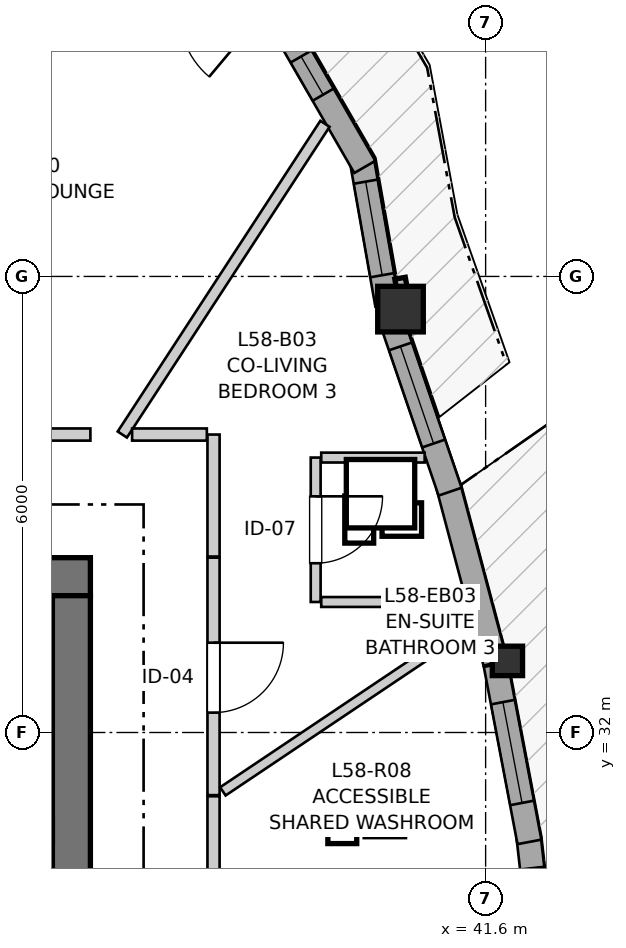
"""IFC4 building model, lengths in metres.
Left out: names, types, materials, properties, quantities, classifications, styles, units other than length and angle.
Written with IfcOpenShell. Run it as: python <this file> out.ifc"""

import sys

from ifc_helpers import new_model, si_unit, direction, frame, frame_2d, origin, origin_2d, place, context, subcontext, project, spatial, rectangle, i_section, extrude, source, transform, mapped, element, fill, save


model = new_model("IFC4")
c1 = context("Model", 3, precision=1e-05, world=origin(), true_north=direction((0.0, 1.0)))
c2 = subcontext(c1, "Body", "Model", "MODEL_VIEW")
j1 = project(units=[si_unit("LENGTHUNIT", "METRE"), si_unit("PLANEANGLEUNIT", "RADIAN")], contexts=[c1])
p1 = place(None, origin())
s1 = spatial("IfcSite", under=j1, at=p1, CompositionType="ELEMENT")
p2 = place(p1, origin())
s2 = spatial("IfcBuilding", under=s1, at=p2, CompositionType="ELEMENT")
p3 = place(p2, frame((0.0, 0.0, 195.6)))
s3 = spatial("IfcBuildingStorey", under=s2, at=p3, CompositionType="ELEMENT", Elevation=195.6)
p4 = place(p3, frame((36.4, 34.05, 0.0), z_axis=(0.0, 0.0, 1.0), x_axis=(-1.0, 0.0, 0.0)))
e1 = element("IfcWall", 1, at=p4, inside=s3, PredefinedType="SHEAR", context=c2, shape_type="SweptSolid", body=[
    extrude(rectangle(XDim=12.1, YDim=0.5, at=frame_2d((6.05, 0.0))), origin(), (0.0, 0.0, 1.0), 2.96),
])
p5 = place(p3, frame((36.15, 18.2, 0.0), z_axis=(0.0, 0.0, 1.0), x_axis=(0.0, 1.0, 0.0)))
e2 = element("IfcWall", 2, at=p5, inside=s3, PredefinedType="SHEAR", context=c2, shape_type="SweptSolid", body=[
    extrude(rectangle(XDim=15.6, YDim=0.5, at=frame_2d((7.8, 0.0))), origin(), (0.0, 0.0, 1.0), 2.96),
])
p6 = place(p5, frame((4.25, 0.0, 0.0)))
e3 = element("IfcOpeningElement", 3, at=p6, cuts=e2, PredefinedType="OPENING", context=c2, shape_type="SweptSolid", body=[
    extrude(rectangle(XDim=1.1, YDim=2.15, at=frame_2d((0.55, 1.075))), frame((0.0, 0.26, 0.0), z_axis=(0.0, -1.0, 0.0), x_axis=(1.0, 0.0, 0.0)), (0.0, 0.0, 1.0), 0.52),
])
p7 = place(p5, frame((10.25, 0.0, 0.0)))
e4 = element("IfcOpeningElement", 4, at=p7, cuts=e2, PredefinedType="OPENING", context=c2, shape_type="SweptSolid", body=[
    extrude(rectangle(XDim=1.1, YDim=2.15, at=frame_2d((0.55, 1.075))), frame((0.0, 0.26, 0.0), z_axis=(0.0, -1.0, 0.0), x_axis=(1.0, 0.0, 0.0)), (0.0, 0.0, 1.0), 0.52),
])
p8 = place(p3, frame((24.8, 30.7, 0.0), z_axis=(0.0, 0.0, 1.0), x_axis=(1.0, 0.0, 0.0)))
e5 = element("IfcWall", 5, at=p8, inside=s3, PredefinedType="SHEAR", context=c2, shape_type="SweptSolid", body=[
    extrude(rectangle(XDim=11.1, YDim=0.3, at=frame_2d((5.55, 0.0))), origin(), (0.0, 0.0, 1.0), 2.96),
])
p9 = place(p8, frame((6.22, 0.0, 0.0)))
e6 = element("IfcOpeningElement", 6, at=p9, cuts=e5, PredefinedType="OPENING", context=c2, shape_type="SweptSolid", body=[
    extrude(rectangle(XDim=0.98, YDim=2.15, at=frame_2d((0.49, 1.075))), frame((0.0, 0.16, 0.0), z_axis=(0.0, -1.0, 0.0), x_axis=(1.0, 0.0, 0.0)), (0.0, 0.0, 1.0), 0.32),
])
p10 = place(p8, frame((9.15, 0.0, 0.0)))
e7 = element("IfcOpeningElement", 7, at=p10, cuts=e5, PredefinedType="OPENING", context=c2, shape_type="SweptSolid", body=[
    extrude(rectangle(XDim=1.15, YDim=2.15, at=frame_2d((0.575, 1.075))), frame((0.0, 0.16, 0.0), z_axis=(0.0, -1.0, 0.0), x_axis=(1.0, 0.0, 0.0)), (0.0, 0.0, 1.0), 0.32),
])
m1 = source(origin(), c2, "Body", "SweptSolid", [
    extrude(i_section(OverallWidth=0.398, OverallDepth=0.387, WebThickness=0.019, FlangeThickness=0.03, FilletRadius=0.015, at=origin_2d()), origin(), (0.0, 0.0, 1.0), 2.96),
])
p11 = place(p3, frame((41.887, 32.942, 0.0), z_axis=(0.0, 0.0, 1.0), x_axis=(1.0, 0.0, 0.0)))
e8 = element("IfcColumn", 8, at=p11, inside=s3, PredefinedType="PILASTER", context=c2, shape_type="MappedRepresentation", body=[
    mapped(m1, transform((0.0, 0.0, 0.0), x_axis=(1.0, 0.0, 0.0), y_axis=(0.0, 1.0, 0.0), z_axis=(0.0, 0.0, 1.0), scale=1.0)),
])
m2 = source(origin(), c2, "Body", "SweptSolid", [
    extrude(rectangle(XDim=0.6, YDim=0.6, at=origin_2d()), origin(), (0.0, 0.0, 1.0), 2.96),
])
p12 = place(p3, frame((40.48, 37.57, 0.0), z_axis=(0.0, 0.0, 1.0), x_axis=(1.0, 0.0, 0.0)))
e9 = element("IfcColumn", 9, at=p12, inside=s3, PredefinedType="COLUMN", context=c2, shape_type="MappedRepresentation", body=[
    mapped(m2, transform((0.0, 0.0, 0.0), x_axis=(1.0, 0.0, 0.0), y_axis=(0.0, 1.0, 0.0), z_axis=(0.0, 0.0, 1.0), scale=1.0)),
])
p13 = place(p3, frame((42.421, 28.385, 0.0), z_axis=(0.0, 0.0, 1.0), x_axis=(-0.113220012761, 0.993569941529, 0.0)))
e10 = element("IfcWall", 10, at=p13, inside=s3, PredefinedType="SOLIDWALL", context=c2, shape_type="SweptSolid", body=[
    extrude(rectangle(XDim=2.277, YDim=0.32, at=frame_2d((1.139, 0.0))), origin(), (0.0, 0.0, 1.0), 2.58),
])
p14 = place(p13, frame((0.842, 0.0, 0.0)))
e11 = element("IfcOpeningElement", 11, at=p14, cuts=e10, PredefinedType="OPENING", context=c2, shape_type="SweptSolid", body=[
    extrude(rectangle(XDim=1.0, YDim=2.1, at=frame_2d((0.5, 1.05))), frame((0.0, 0.17, 0.0), z_axis=(0.0, -1.0, 0.0), x_axis=(1.0, 0.0, 0.0)), (0.0, 0.0, 1.0), 0.34),
])
p15 = place(p3, frame((42.177, 30.561, 0.0), z_axis=(0.0, 0.0, 1.0), x_axis=(-0.186691421418, 0.982418603839, 0.0)))
e12 = element("IfcWall", 12, at=p15, inside=s3, PredefinedType="SOLIDWALL", context=c2, shape_type="SweptSolid", body=[
    extrude(rectangle(XDim=2.374, YDim=0.32, at=frame_2d((1.187, 0.0))), origin(), (0.0, 0.0, 1.0), 2.58),
])
p16 = place(p15, frame((0.522, 0.0, 0.82)))
e13 = element("IfcOpeningElement", 13, at=p16, cuts=e12, PredefinedType="OPENING", context=c2, shape_type="SweptSolid", body=[
    extrude(rectangle(XDim=1.35, YDim=1.45, at=frame_2d((0.675, 0.725))), frame((0.0, 0.17, 0.0), z_axis=(0.0, -1.0, 0.0), x_axis=(1.0, 0.0, 0.0)), (0.0, 0.0, 1.0), 0.34),
])
p17 = place(p3, frame((41.727, 32.92, 0.0), z_axis=(0.0, 0.0, 1.0), x_axis=(-0.257057896323, 0.96639600472, 0.0)))
e14 = element("IfcWall", 14, at=p17, inside=s3, PredefinedType="SOLIDWALL", context=c2, shape_type="SweptSolid", body=[
    extrude(rectangle(XDim=2.412, YDim=0.32, at=frame_2d((1.206, 0.0))), origin(), (0.0, 0.0, 1.0), 2.58),
])
p18 = place(p3, frame((41.132, 35.168, 0.0), z_axis=(0.0, 0.0, 1.0), x_axis=(-0.323654036362, 0.94617549363, 0.0)))
e15 = element("IfcWall", 15, at=p18, inside=s3, PredefinedType="SOLIDWALL", context=c2, shape_type="SweptSolid", body=[
    extrude(rectangle(XDim=2.394, YDim=0.32, at=frame_2d((1.197, 0.0))), origin(), (0.0, 0.0, 1.0), 2.58),
])
p19 = place(p18, frame((0.67, 0.0, 0.82)))
e16 = element("IfcOpeningElement", 16, at=p19, cuts=e15, PredefinedType="OPENING", context=c2, shape_type="SweptSolid", body=[
    extrude(rectangle(XDim=1.35, YDim=1.45, at=frame_2d((0.675, 0.725))), frame((0.0, 0.17, 0.0), z_axis=(0.0, -1.0, 0.0), x_axis=(1.0, 0.0, 0.0)), (0.0, 0.0, 1.0), 0.34),
])
p20 = place(p3, frame((40.307, 37.631, 0.0), z_axis=(0.0, 0.0, 1.0), x_axis=(-0.173671780312, 0.984803590937, 0.0)))
e17 = element("IfcWall", 17, at=p20, inside=s3, PredefinedType="SOLIDWALL", context=c2, shape_type="SweptSolid", body=[
    extrude(rectangle(XDim=1.962, YDim=0.32, at=frame_2d((0.981, 0.0))), origin(), (0.0, 0.0, 1.0), 2.58),
])
p21 = place(p20, frame((0.391, 0.0, 0.82)))
e18 = element("IfcOpeningElement", 18, at=p21, cuts=e17, PredefinedType="OPENING", context=c2, shape_type="SweptSolid", body=[
    extrude(rectangle(XDim=1.25, YDim=1.35, at=frame_2d((0.625, 0.675))), frame((0.0, 0.17, 0.0), z_axis=(0.0, -1.0, 0.0), x_axis=(1.0, 0.0, 0.0)), (0.0, 0.0, 1.0), 0.34),
])
p22 = place(p3, frame((40.01, 39.441, 0.0), z_axis=(0.0, 0.0, 1.0), x_axis=(-0.49990781971, 0.866078617559, 0.0)))
e19 = element("IfcWall", 19, at=p22, inside=s3, PredefinedType="SOLIDWALL", context=c2, shape_type="SweptSolid", body=[
    extrude(rectangle(XDim=2.09, YDim=0.32, at=frame_2d((1.045, 0.0))), origin(), (0.0, 0.0, 1.0), 2.58),
])
p23 = place(p22, frame((1.097, 0.0, 0.82)))
e20 = element("IfcOpeningElement", 20, at=p23, cuts=e19, PredefinedType="OPENING", context=c2, shape_type="SweptSolid", body=[
    extrude(rectangle(XDim=0.58, YDim=1.35, at=frame_2d((0.29, 0.675))), frame((0.0, 0.17, 0.0), z_axis=(0.0, -1.0, 0.0), x_axis=(1.0, 0.0, 0.0)), (0.0, 0.0, 1.0), 0.34),
])
p24 = place(p3, frame((32.487, 35.92, 0.0), z_axis=(0.0, 0.0, 1.0), x_axis=(1.0, 0.0, 0.0)))
e21 = element("IfcWall", 21, at=p24, inside=s3, PredefinedType="PARTITIONING", context=c2, shape_type="SweptSolid", body=[
    extrude(rectangle(XDim=3.913, YDim=0.16, at=frame_2d((1.957, 0.0))), origin(), (0.0, 0.0, 1.0), 2.628),
])
p25 = place(p24, frame((1.291, 0.0, 0.0)))
e22 = element("IfcOpeningElement", 22, at=p25, cuts=e21, PredefinedType="OPENING", context=c2, shape_type="SweptSolid", body=[
    extrude(rectangle(XDim=1.3, YDim=2.1, at=frame_2d((0.65, 1.05))), frame((0.0, 0.09, 0.0), z_axis=(0.0, -1.0, 0.0), x_axis=(1.0, 0.0, 0.0)), (0.0, 0.0, 1.0), 0.18),
])
p26 = place(p3, frame((38.02, 31.161, 0.0), z_axis=(0.0, 0.0, 1.0), x_axis=(0.0, -1.0, 0.0)))
e23 = element("IfcWall", 23, at=p26, inside=s3, PredefinedType="PARTITIONING", context=c2, shape_type="SweptSolid", body=[
    extrude(rectangle(XDim=3.333, YDim=0.16, at=frame_2d((1.667, 0.0))), origin(), (0.0, 0.0, 1.0), 2.628),
])
p27 = place(p26, frame((1.193, 0.0, 0.0)))
e24 = element("IfcOpeningElement", 24, at=p27, cuts=e23, PredefinedType="OPENING", context=c2, shape_type="SweptSolid", body=[
    extrude(rectangle(XDim=0.95, YDim=2.1, at=frame_2d((0.475, 1.05))), frame((0.0, 0.09, 0.0), z_axis=(0.0, -1.0, 0.0), x_axis=(1.0, 0.0, 0.0)), (0.0, 0.0, 1.0), 0.18),
])
p28 = place(p3, frame((38.02, 34.3, 0.0), z_axis=(0.0, 0.0, 1.0), x_axis=(0.0, -1.0, 0.0)))
e25 = element("IfcWall", 25, at=p28, inside=s3, PredefinedType="PARTITIONING", context=c2, shape_type="SweptSolid", body=[
    extrude(rectangle(XDim=3.124, YDim=0.16, at=frame_2d((1.562, 0.0))), origin(), (0.0, 0.0, 1.0), 2.628),
])
p29 = place(p28, frame((1.118, 0.0, 0.0)))
e26 = element("IfcOpeningElement", 26, at=p29, cuts=e25, PredefinedType="OPENING", context=c2, shape_type="SweptSolid", body=[
    extrude(rectangle(XDim=0.92, YDim=2.1, at=frame_2d((0.46, 1.05))), frame((0.0, 0.09, 0.0), z_axis=(0.0, -1.0, 0.0), x_axis=(1.0, 0.0, 0.0)), (0.0, 0.0, 1.0), 0.18),
])
p30 = place(p3, frame((39.364, 35.617, 0.0), z_axis=(0.0, 0.0, 1.0), x_axis=(0.0, -1.0, 0.0)))
e27 = element("IfcWall", 27, at=p30, inside=s3, PredefinedType="PARTITIONING", context=c2, shape_type="SweptSolid", body=[
    extrude(rectangle(XDim=1.9, YDim=0.13, at=frame_2d((0.95, 0.0))), origin(), (0.0, 0.0, 1.0), 2.598),
])
p31 = place(p30, frame((0.51, 0.0, 0.0)))
e28 = element("IfcOpeningElement", 28, at=p31, cuts=e27, PredefinedType="OPENING", context=c2, shape_type="SweptSolid", body=[
    extrude(rectangle(XDim=0.88, YDim=2.05, at=frame_2d((0.44, 1.025))), frame((0.0, 0.075, 0.0), z_axis=(0.0, -1.0, 0.0), x_axis=(1.0, 0.0, 0.0)), (0.0, 0.0, 1.0), 0.15),
])
p32 = place(p3, frame((36.82, 35.92, 0.0), z_axis=(0.0, 0.0, 1.0), x_axis=(0.546222005159, 0.83764044857, 0.0)))
e29 = element("IfcWall", 29, at=p32, inside=s3, PredefinedType="PARTITIONING", context=c2, shape_type="SweptSolid", body=[
    extrude(rectangle(XDim=4.881, YDim=0.145, at=frame_2d((2.44, 0.0))), origin(), (0.0, 0.0, 1.0), 2.96),
])
p33 = place(p3, frame((38.143, 31.225, 0.0), z_axis=(0.0, 0.0, 1.0), x_axis=(0.830560844451, 0.556927898084, 0.0)))
e30 = element("IfcWall", 30, at=p33, inside=s3, PredefinedType="PARTITIONING", context=c2, shape_type="SweptSolid", body=[
    extrude(rectangle(XDim=3.942, YDim=0.13, at=frame_2d((1.971, 0.0))), origin(), (0.0, 0.0, 1.0), 2.96),
])
p34 = place(p3, frame((39.437, 33.717, 0.0), z_axis=(0.0, 0.0, 1.0), x_axis=(1.0, 0.0, 0.0)))
e31 = element("IfcWall", 31, at=p34, inside=s3, PredefinedType="PARTITIONING", context=c2, shape_type="SweptSolid", body=[
    extrude(rectangle(XDim=1.727, YDim=0.13, at=frame_2d((0.864, 0.0))), origin(), (0.0, 0.0, 1.0), 2.96),
])
p35 = place(p3, frame((38.02, 34.315, 0.0), z_axis=(0.0, 0.0, 1.0), x_axis=(0.0, 1.0, 0.0)))
e32 = element("IfcWall", 32, at=p35, inside=s3, PredefinedType="PARTITIONING", context=c2, shape_type="SweptSolid", body=[
    extrude(rectangle(XDim=1.605, YDim=0.16, at=frame_2d((0.802, 0.0))), origin(), (0.0, 0.0, 1.0), 2.628),
])
p36 = place(p3, frame((39.437, 35.617, 0.0), z_axis=(0.0, 0.0, 1.0), x_axis=(1.0, 0.0, 0.0)))
e33 = element("IfcWall", 33, at=p36, inside=s3, PredefinedType="PARTITIONING", context=c2, shape_type="SweptSolid", body=[
    extrude(rectangle(XDim=1.361, YDim=0.13, at=frame_2d((0.68, 0.0))), origin(), (0.0, 0.0, 1.0), 2.96),
])
p37 = place(p3, frame((36.949, 35.92, 0.0), z_axis=(0.0, 0.0, 1.0), x_axis=(1.0, 0.0, 0.0)))
e34 = element("IfcWall", 34, at=p37, inside=s3, PredefinedType="PARTITIONING", context=c2, shape_type="SweptSolid", body=[
    extrude(rectangle(XDim=0.983, YDim=0.16, at=frame_2d((0.492, 0.0))), origin(), (0.0, 0.0, 1.0), 2.96),
])
m3 = source(origin(), c2, "Body", "SweptSolid", [
    extrude(rectangle(XDim=1.35, YDim=1.45, at=frame_2d((0.675, 0.725))), frame((0.0, 0.03, 0.0), z_axis=(0.0, -1.0, 0.0), x_axis=(1.0, 0.0, 0.0)), (0.0, 0.0, 1.0), 0.06),
])
p38 = place(p16, origin())
e35 = element("IfcWindow", 35, at=p38, inside=s3, PartitioningType="SINGLE_PANEL", PredefinedType="WINDOW", context=c2, shape_type="MappedRepresentation", body=[
    mapped(m3, transform((0.0, 0.0, 0.0), x_axis=(1.0, 0.0, 0.0), y_axis=(0.0, 1.0, 0.0), z_axis=(0.0, 0.0, 1.0), scale=1.0)),
])
fill(e13, e35)
p39 = place(p19, origin())
e36 = element("IfcWindow", 36, at=p39, inside=s3, PartitioningType="SINGLE_PANEL", PredefinedType="WINDOW", context=c2, shape_type="MappedRepresentation", body=[
    mapped(m3, transform((0.0, 0.0, 0.0), x_axis=(1.0, 0.0, 0.0), y_axis=(0.0, 1.0, 0.0), z_axis=(0.0, 0.0, 1.0), scale=1.0)),
])
fill(e16, e36)
m4 = source(origin(), c2, "Body", "SweptSolid", [
    extrude(rectangle(XDim=1.25, YDim=1.35, at=frame_2d((0.625, 0.675))), frame((0.0, 0.03, 0.0), z_axis=(0.0, -1.0, 0.0), x_axis=(1.0, 0.0, 0.0)), (0.0, 0.0, 1.0), 0.06),
])
p40 = place(p21, origin())
e37 = element("IfcWindow", 37, at=p40, inside=s3, PartitioningType="SINGLE_PANEL", PredefinedType="WINDOW", context=c2, shape_type="MappedRepresentation", body=[
    mapped(m4, transform((0.0, 0.0, 0.0), x_axis=(1.0, 0.0, 0.0), y_axis=(0.0, 1.0, 0.0), z_axis=(0.0, 0.0, 1.0), scale=1.0)),
])
fill(e18, e37)
m5 = source(origin(), c2, "Body", "SweptSolid", [
    extrude(rectangle(XDim=0.58, YDim=1.35, at=frame_2d((0.29, 0.675))), frame((0.0, 0.03, 0.0), z_axis=(0.0, -1.0, 0.0), x_axis=(1.0, 0.0, 0.0)), (0.0, 0.0, 1.0), 0.06),
])
p41 = place(p23, origin())
e38 = element("IfcWindow", 38, at=p41, inside=s3, PartitioningType="SINGLE_PANEL", PredefinedType="WINDOW", context=c2, shape_type="MappedRepresentation", body=[
    mapped(m5, transform((0.0, 0.0, 0.0), x_axis=(1.0, 0.0, 0.0), y_axis=(0.0, 1.0, 0.0), z_axis=(0.0, 0.0, 1.0), scale=1.0)),
])
fill(e20, e38)
m6 = source(origin(), c2, "Body", "SweptSolid", [
    extrude(rectangle(XDim=0.92, YDim=2.1, at=frame_2d((0.46, 1.05))), frame((0.0, 0.025, 0.0), z_axis=(0.0, -1.0, 0.0), x_axis=(1.0, 0.0, 0.0)), (0.0, 0.0, 1.0), 0.05),
])
p42 = place(p29, origin())
e39 = element("IfcDoor", 39, at=p42, inside=s3, OperationType="SINGLE_SWING_LEFT", PredefinedType="DOOR", context=c2, shape_type="MappedRepresentation", body=[
    mapped(m6, transform((0.0, 0.0, 0.0), x_axis=(1.0, 0.0, 0.0), y_axis=(0.0, 1.0, 0.0), z_axis=(0.0, 0.0, 1.0), scale=1.0)),
])
fill(e26, e39)
m7 = source(origin(), c2, "Body", "SweptSolid", [
    extrude(rectangle(XDim=0.88, YDim=2.05, at=frame_2d((0.44, 1.025))), frame((0.0, 0.025, 0.0), z_axis=(0.0, -1.0, 0.0), x_axis=(1.0, 0.0, 0.0)), (0.0, 0.0, 1.0), 0.05),
])
p43 = place(p31, origin())
e40 = element("IfcDoor", 40, at=p43, inside=s3, OperationType="SINGLE_SWING_LEFT", PredefinedType="DOOR", context=c2, shape_type="MappedRepresentation", body=[
    mapped(m7, transform((0.0, 0.0, 0.0), x_axis=(1.0, 0.0, 0.0), y_axis=(0.0, 1.0, 0.0), z_axis=(0.0, 0.0, 1.0), scale=1.0)),
])
fill(e28, e40)
save(model, sys.argv[1])
